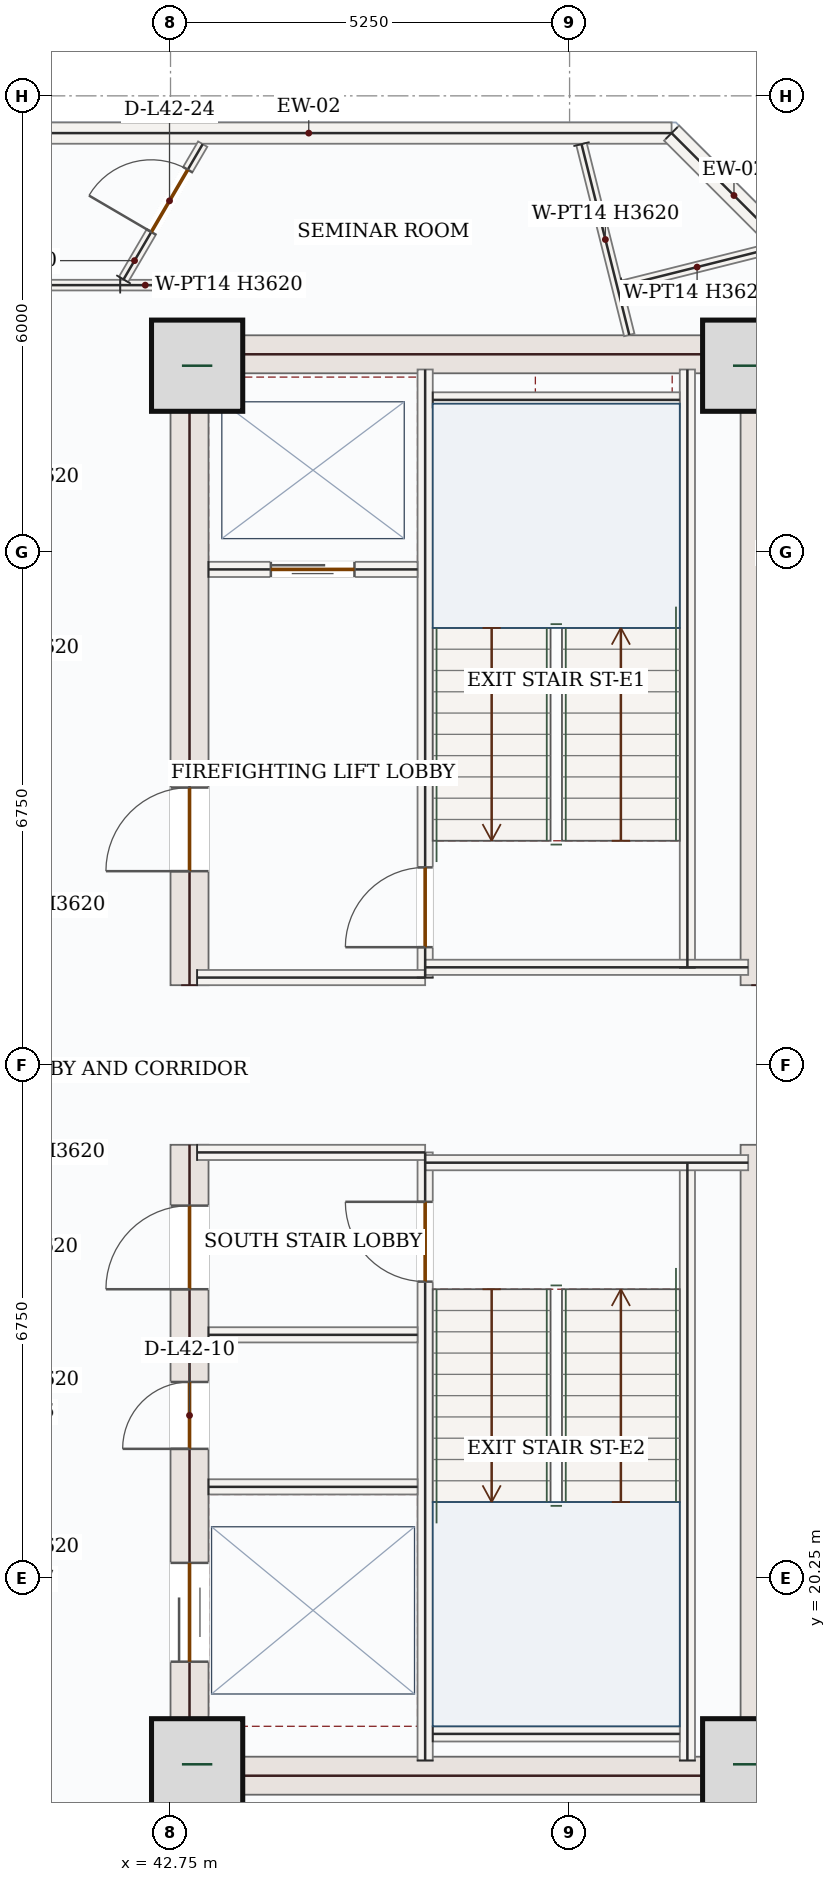
"""IFC4 building model, lengths in metres.
Left out: names, types, materials, properties, quantities, classifications, styles, units other than length and angle.
Written with IfcOpenShell. Run it as: python <this file> out.ifc"""

import sys

from ifc_helpers import new_model, si_unit, direction, frame, frame_2d, origin, origin_2d, place, context, subcontext, project, spatial, rectangle, extrude, source, transform, mapped, element, fill, save


model = new_model("IFC4")
c1 = context("Model", 3, precision=1e-05, world=origin(), true_north=direction((0.0, 1.0)))
c2 = subcontext(c1, "Body", "Model", "MODEL_VIEW")
j1 = project(units=[si_unit("LENGTHUNIT", "METRE"), si_unit("PLANEANGLEUNIT", "RADIAN")], contexts=[c1])
p1 = place(None, origin())
s1 = spatial("IfcSite", under=j1, at=p1, CompositionType="ELEMENT")
p2 = place(p1, origin())
s2 = spatial("IfcBuilding", under=s1, at=p2, CompositionType="ELEMENT")
p3 = place(p2, frame((0.0, 0.0, 182.4)))
s3 = spatial("IfcBuildingStorey", under=s2, at=p3, CompositionType="ELEMENT", Elevation=182.4)
p4 = place(p3, frame((43.0, 17.4, 0.0), z_axis=(0.0, 0.0, 1.0), x_axis=(0.0, 1.0, 0.0)))
e1 = element("IfcWall", 1, at=p4, inside=s3, PredefinedType="SHEAR", context=c2, shape_type="SweptSolid", body=[
    extrude(rectangle(XDim=8.55, YDim=0.5, at=frame_2d((4.275, 0.0))), origin(), (0.0, 0.0, 1.0), 3.62),
])
p5 = place(p4, frame((6.65, 0.0, 0.0)))
e2 = element("IfcOpeningElement", 2, at=p5, cuts=e1, PredefinedType="OPENING", context=c2, shape_type="SweptSolid", body=[
    extrude(rectangle(XDim=1.1, YDim=2.2, at=frame_2d((0.55, 1.1))), frame((0.0, 0.26, 0.0), z_axis=(0.0, -1.0, 0.0), x_axis=(1.0, 0.0, 0.0)), (0.0, 0.0, 1.0), 0.52),
])
p6 = place(p4, frame((1.75, 0.0, 0.0)))
e3 = element("IfcOpeningElement", 3, at=p6, cuts=e1, PredefinedType="OPENING", context=c2, shape_type="SweptSolid", body=[
    extrude(rectangle(XDim=1.3, YDim=2.2, at=frame_2d((0.65, 1.1))), frame((0.0, 0.26, 0.0), z_axis=(0.0, -1.0, 0.0), x_axis=(1.0, 0.0, 0.0)), (0.0, 0.0, 1.0), 0.52),
])
p7 = place(p4, frame((4.55, 0.0, 0.0)))
e4 = element("IfcOpeningElement", 4, at=p7, cuts=e1, PredefinedType="OPENING", context=c2, shape_type="SweptSolid", body=[
    extrude(rectangle(XDim=0.88, YDim=2.1, at=frame_2d((0.44, 1.05))), frame((0.0, 0.26, 0.0), z_axis=(0.0, -1.0, 0.0), x_axis=(1.0, 0.0, 0.0)), (0.0, 0.0, 1.0), 0.52),
])
p8 = place(p3, frame((43.0, 28.05, 0.0), z_axis=(0.0, 0.0, 1.0), x_axis=(0.0, 1.0, 0.0)))
e5 = element("IfcWall", 5, at=p8, inside=s3, PredefinedType="SHEAR", context=c2, shape_type="SweptSolid", body=[
    extrude(rectangle(XDim=8.55, YDim=0.5, at=frame_2d((4.275, 0.0))), origin(), (0.0, 0.0, 1.0), 3.62),
])
p9 = place(p8, frame((1.5, 0.0, 0.0)))
e6 = element("IfcOpeningElement", 6, at=p9, cuts=e5, PredefinedType="OPENING", context=c2, shape_type="SweptSolid", body=[
    extrude(rectangle(XDim=1.1, YDim=2.2, at=frame_2d((0.55, 1.1))), frame((0.0, 0.26, 0.0), z_axis=(0.0, -1.0, 0.0), x_axis=(1.0, 0.0, 0.0)), (0.0, 0.0, 1.0), 0.52),
])
m1 = source(origin(), c2, "Body", "SweptSolid", [
    extrude(rectangle(XDim=8.55, YDim=0.5, at=frame_2d((4.275, 0.0))), origin(), (0.0, 0.0, 1.0), 3.62),
])
for number, where, z_axis, x_axis in (
    (7, (50.5, 17.4, 0.0), (0.0, 0.0, 1.0), (0.0, 1.0, 0.0)),
    (8, (50.5, 28.05, 0.0), (0.0, 0.0, 1.0), (0.0, 1.0, 0.0)),
):
    element("IfcWall", number, at=place(p3, frame(where, z_axis=z_axis, x_axis=x_axis)), inside=s3, PredefinedType="SHEAR", context=c2, shape_type="MappedRepresentation", body=[
        mapped(m1, transform((0.0, 0.0, 0.0), x_axis=(1.0, 0.0, 0.0), y_axis=(0.0, 1.0, 0.0), z_axis=(0.0, 0.0, 1.0), scale=1.0)),
    ])
m2 = source(origin(), c2, "Body", "SweptSolid", [
    extrude(rectangle(XDim=7.0, YDim=0.5, at=frame_2d((3.5, 0.0))), origin(), (0.0, 0.0, 1.0), 3.62),
])
for number, where, z_axis, x_axis in (
    (9, (43.25, 17.65, 0.0), (0.0, 0.0, 1.0), (1.0, 0.0, 0.0)),
    (10, (43.25, 36.35, 0.0), (0.0, 0.0, 1.0), (1.0, 0.0, 0.0)),
):
    element("IfcWall", number, at=place(p3, frame(where, z_axis=z_axis, x_axis=x_axis)), inside=s3, PredefinedType="SHEAR", context=c2, shape_type="MappedRepresentation", body=[
        mapped(m2, transform((0.0, 0.0, 0.0), x_axis=(1.0, 0.0, 0.0), y_axis=(0.0, 1.0, 0.0), z_axis=(0.0, 0.0, 1.0), scale=1.0)),
    ])
m3 = source(origin(), c2, "Body", "SweptSolid", [
    extrude(rectangle(XDim=1.2, YDim=1.2, at=origin_2d()), origin(), (0.0, 0.0, 1.0), 3.9),
])
for number, where, z_axis, x_axis in (
    (11, (43.1, 17.8, 0.0), (0.0, 0.0, 1.0), (1.0, 0.0, 0.0)),
    (12, (50.35, 17.8, 0.0), (0.0, 0.0, 1.0), (1.0, 0.0, 0.0)),
    (13, (43.1, 36.2, 0.0), (0.0, 0.0, 1.0), (1.0, 0.0, 0.0)),
    (14, (50.35, 36.2, 0.0), (0.0, 0.0, 1.0), (1.0, 0.0, 0.0)),
):
    element("IfcColumn", number, at=place(p3, frame(where, z_axis=z_axis, x_axis=x_axis)), inside=s3, PredefinedType="COLUMN", context=c2, shape_type="MappedRepresentation", body=[
        mapped(m3, transform((0.0, 0.0, 0.0), x_axis=(1.0, 0.0, 0.0), y_axis=(0.0, 1.0, 0.0), z_axis=(0.0, 0.0, 1.0), scale=1.0)),
    ])
p10 = place(p3, frame((53.06, 18.458, 0.0), z_axis=(0.0, 0.0, 1.0), x_axis=(-0.707106781187, -0.707106781187, 0.0)))
e15 = element("IfcWall", 15, at=p10, inside=s3, PredefinedType="SOLIDWALL", context=c2, shape_type="SweptSolid", body=[
    extrude(rectangle(XDim=5.258, YDim=0.28, at=frame_2d((2.629, 0.0))), origin(), (0.0, 0.0, 1.0), 3.62),
])
p11 = place(p10, frame((1.729, 0.0, 0.85)))
e16 = element("IfcOpeningElement", 16, at=p11, cuts=e15, PredefinedType="OPENING", context=c2, shape_type="SweptSolid", body=[
    extrude(rectangle(XDim=1.8, YDim=1.75, at=frame_2d((0.9, 0.875))), frame((0.0, 0.15, 0.0), z_axis=(0.0, -1.0, 0.0), x_axis=(1.0, 0.0, 0.0)), (0.0, 0.0, 1.0), 0.3),
])
m4 = source(origin(), c2, "Body", "SweptSolid", [
    extrude(rectangle(XDim=9.547, YDim=0.28, at=frame_2d((4.773, 0.0))), origin(), (0.0, 0.0, 1.0), 3.62),
])
p12 = place(p3, frame((39.795, 39.26, 0.0), z_axis=(0.0, 0.0, 1.0), x_axis=(1.0, 0.0, 0.0)))
e17 = element("IfcWall", 17, at=p12, inside=s3, PredefinedType="SOLIDWALL", context=c2, shape_type="MappedRepresentation", body=[
    mapped(m4, transform((0.0, 0.0, 0.0), x_axis=(1.0, 0.0, 0.0), y_axis=(0.0, 1.0, 0.0), z_axis=(0.0, 0.0, 1.0), scale=1.0)),
])
m5 = source(origin(), c2, "Body", "SweptSolid", [
    extrude(rectangle(XDim=2.322, YDim=0.28, at=frame_2d((1.161, 0.0))), origin(), (0.0, 0.0, 1.0), 3.62),
])
p13 = place(p3, frame((49.342, 39.26, 0.0), z_axis=(0.0, 0.0, 1.0), x_axis=(0.707106781187, -0.707106781187, 0.0)))
e18 = element("IfcWall", 18, at=p13, inside=s3, PredefinedType="SOLIDWALL", context=c2, shape_type="MappedRepresentation", body=[
    mapped(m5, transform((0.0, 0.0, 0.0), x_axis=(1.0, 0.0, 0.0), y_axis=(0.0, 1.0, 0.0), z_axis=(0.0, 0.0, 1.0), scale=1.0)),
])
m6 = source(origin(), c2, "Body", "SweptSolid", [
    extrude(rectangle(XDim=7.87, YDim=0.2, at=frame_2d((3.935, 0.0))), origin(), (0.0, 0.0, 1.0), 3.62),
])
for number, where, z_axis, x_axis in (
    (19, (49.55, 17.85, 0.0), (0.0, 0.0, 1.0), (0.0, 1.0, 0.0)),
    (20, (49.55, 28.28, 0.0), (0.0, 0.0, 1.0), (0.0, 1.0, 0.0)),
):
    element("IfcWall", number, at=place(p3, frame(where, z_axis=z_axis, x_axis=x_axis)), inside=s3, PredefinedType="SOLIDWALL", context=c2, shape_type="MappedRepresentation", body=[
        mapped(m6, transform((0.0, 0.0, 0.0), x_axis=(1.0, 0.0, 0.0), y_axis=(0.0, 1.0, 0.0), z_axis=(0.0, 0.0, 1.0), scale=1.0)),
    ])
p14 = place(p3, frame((46.1, 17.85, 0.0), z_axis=(0.0, 0.0, 1.0), x_axis=(0.0, 1.0, 0.0)))
e21 = element("IfcWall", 21, at=p14, inside=s3, PredefinedType="SOLIDWALL", context=c2, shape_type="SweptSolid", body=[
    extrude(rectangle(XDim=8.0, YDim=0.2, at=frame_2d((4.0, 0.0))), origin(), (0.0, 0.0, 1.0), 3.62),
])
p15 = place(p14, frame((6.3, 0.0, 0.0)))
e22 = element("IfcOpeningElement", 22, at=p15, cuts=e21, PredefinedType="OPENING", context=c2, shape_type="SweptSolid", body=[
    extrude(rectangle(XDim=1.05, YDim=2.15, at=frame_2d((0.525, 1.075))), frame((0.0, 0.11, 0.0), z_axis=(0.0, -1.0, 0.0), x_axis=(1.0, 0.0, 0.0)), (0.0, 0.0, 1.0), 0.22),
])
p16 = place(p3, frame((46.1, 28.15, 0.0), z_axis=(0.0, 0.0, 1.0), x_axis=(0.0, 1.0, 0.0)))
e23 = element("IfcWall", 23, at=p16, inside=s3, PredefinedType="SOLIDWALL", context=c2, shape_type="SweptSolid", body=[
    extrude(rectangle(XDim=8.0, YDim=0.2, at=frame_2d((4.0, 0.0))), origin(), (0.0, 0.0, 1.0), 3.62),
])
p17 = place(p16, frame((0.4, 0.0, 0.0)))
e24 = element("IfcOpeningElement", 24, at=p17, cuts=e23, PredefinedType="OPENING", context=c2, shape_type="SweptSolid", body=[
    extrude(rectangle(XDim=1.05, YDim=2.15, at=frame_2d((0.525, 1.075))), frame((0.0, 0.11, 0.0), z_axis=(0.0, -1.0, 0.0), x_axis=(1.0, 0.0, 0.0)), (0.0, 0.0, 1.0), 0.22),
])
m7 = source(origin(), c2, "Body", "SweptSolid", [
    extrude(rectangle(XDim=3.0, YDim=0.2, at=frame_2d((1.5, 0.0))), origin(), (0.0, 0.0, 1.0), 3.62),
])
p18 = place(p3, frame((43.1, 25.85, 0.0), z_axis=(0.0, 0.0, 1.0), x_axis=(1.0, 0.0, 0.0)))
e25 = element("IfcWall", 25, at=p18, inside=s3, PredefinedType="SOLIDWALL", context=c2, shape_type="MappedRepresentation", body=[
    mapped(m7, transform((0.0, 0.0, 0.0), x_axis=(1.0, 0.0, 0.0), y_axis=(0.0, 1.0, 0.0), z_axis=(0.0, 0.0, 1.0), scale=1.0)),
])
m8 = source(origin(), c2, "Body", "SweptSolid", [
    extrude(rectangle(XDim=4.25, YDim=0.2, at=frame_2d((2.125, 0.0))), origin(), (0.0, 0.0, 1.0), 3.62),
])
p19 = place(p3, frame((46.1, 25.715, 0.0), z_axis=(0.0, 0.0, 1.0), x_axis=(1.0, 0.0, 0.0)))
e26 = element("IfcWall", 26, at=p19, inside=s3, PredefinedType="SOLIDWALL", context=c2, shape_type="MappedRepresentation", body=[
    mapped(m8, transform((0.0, 0.0, 0.0), x_axis=(1.0, 0.0, 0.0), y_axis=(0.0, 1.0, 0.0), z_axis=(0.0, 0.0, 1.0), scale=1.0)),
])
p20 = place(p3, frame((43.1, 28.15, 0.0), z_axis=(0.0, 0.0, 1.0), x_axis=(1.0, 0.0, 0.0)))
e27 = element("IfcWall", 27, at=p20, inside=s3, PredefinedType="SOLIDWALL", context=c2, shape_type="MappedRepresentation", body=[
    mapped(m7, transform((0.0, 0.0, 0.0), x_axis=(1.0, 0.0, 0.0), y_axis=(0.0, 1.0, 0.0), z_axis=(0.0, 0.0, 1.0), scale=1.0)),
])
p21 = place(p3, frame((46.1, 28.285, 0.0), z_axis=(0.0, 0.0, 1.0), x_axis=(1.0, 0.0, 0.0)))
e28 = element("IfcWall", 28, at=p21, inside=s3, PredefinedType="SOLIDWALL", context=c2, shape_type="MappedRepresentation", body=[
    mapped(m8, transform((0.0, 0.0, 0.0), x_axis=(1.0, 0.0, 0.0), y_axis=(0.0, 1.0, 0.0), z_axis=(0.0, 0.0, 1.0), scale=1.0)),
])
m9 = source(origin(), c2, "Body", "SweptSolid", [
    extrude(rectangle(XDim=3.25, YDim=0.2, at=frame_2d((1.625, 0.0))), origin(), (0.0, 0.0, 1.0), 3.62),
])
for number, where, z_axis, x_axis in (
    (29, (46.2, 35.75, 0.0), (0.0, 0.0, 1.0), (1.0, 0.0, 0.0)),
    (30, (46.2, 18.2, 0.0), (0.0, 0.0, 1.0), (1.0, 0.0, 0.0)),
):
    element("IfcWall", number, at=place(p3, frame(where, z_axis=z_axis, x_axis=x_axis)), inside=s3, PredefinedType="SOLIDWALL", context=c2, shape_type="MappedRepresentation", body=[
        mapped(m9, transform((0.0, 0.0, 0.0), x_axis=(1.0, 0.0, 0.0), y_axis=(0.0, 1.0, 0.0), z_axis=(0.0, 0.0, 1.0), scale=1.0)),
    ])
p22 = place(p3, frame((43.25, 33.52, 0.0), z_axis=(0.0, 0.0, 1.0), x_axis=(1.0, 0.0, 0.0)))
e31 = element("IfcWall", 31, at=p22, inside=s3, PredefinedType="SOLIDWALL", context=c2, shape_type="SweptSolid", body=[
    extrude(rectangle(XDim=2.75, YDim=0.2, at=frame_2d((1.375, 0.0))), origin(), (0.0, 0.0, 1.0), 3.62),
])
p23 = place(p22, frame((0.82, 0.0, 0.0)))
e32 = element("IfcOpeningElement", 32, at=p23, cuts=e31, PredefinedType="OPENING", context=c2, shape_type="SweptSolid", body=[
    extrude(rectangle(XDim=1.1, YDim=2.15, at=frame_2d((0.55, 1.075))), frame((0.0, 0.11, 0.0), z_axis=(0.0, -1.0, 0.0), x_axis=(1.0, 0.0, 0.0)), (0.0, 0.0, 1.0), 0.22),
])
m10 = source(origin(), c2, "Body", "SweptSolid", [
    extrude(rectangle(XDim=2.75, YDim=0.2, at=frame_2d((1.375, 0.0))), origin(), (0.0, 0.0, 1.0), 3.62),
])
for number, where, z_axis, x_axis in (
    (33, (43.25, 23.45, 0.0), (0.0, 0.0, 1.0), (1.0, 0.0, 0.0)),
    (34, (43.25, 21.45, 0.0), (0.0, 0.0, 1.0), (1.0, 0.0, 0.0)),
):
    element("IfcWall", number, at=place(p3, frame(where, z_axis=z_axis, x_axis=x_axis)), inside=s3, PredefinedType="SOLIDWALL", context=c2, shape_type="MappedRepresentation", body=[
        mapped(m10, transform((0.0, 0.0, 0.0), x_axis=(1.0, 0.0, 0.0), y_axis=(0.0, 1.0, 0.0), z_axis=(0.0, 0.0, 1.0), scale=1.0)),
    ])
m11 = source(origin(), c2, "Body", "SweptSolid", [
    extrude(rectangle(XDim=0.66, YDim=0.14, at=frame_2d((0.33, 0.0))), origin(), (0.0, 0.0, 1.0), 3.62),
])
p24 = place(p3, frame((42.748, 37.259, 0.0), z_axis=(0.0, 0.0, 1.0), x_axis=(-0.99999938363, 0.001110287991, 0.0)))
e35 = element("IfcWall", 35, at=p24, inside=s3, PredefinedType="PARTITIONING", context=c2, shape_type="MappedRepresentation", body=[
    mapped(m11, transform((0.0, 0.0, 0.0), x_axis=(1.0, 0.0, 0.0), y_axis=(0.0, 1.0, 0.0), z_axis=(0.0, 0.0, 1.0), scale=1.0)),
])
p25 = place(p3, frame((42.132, 37.335, 0.0), z_axis=(0.0, 0.0, 1.0), x_axis=(0.505011455642, 0.863112640198, 0.0)))
e36 = element("IfcWall", 36, at=p25, inside=s3, PredefinedType="PARTITIONING", context=c2, shape_type="SweptSolid", body=[
    extrude(rectangle(XDim=2.062, YDim=0.14, at=frame_2d((1.031, 0.0))), origin(), (0.0, 0.0, 1.0), 3.62),
])
p26 = place(p25, frame((0.723, 0.0, 0.0)))
e37 = element("IfcOpeningElement", 37, at=p26, cuts=e36, PredefinedType="OPENING", context=c2, shape_type="SweptSolid", body=[
    extrude(rectangle(XDim=0.95, YDim=2.15, at=frame_2d((0.475, 1.075))), frame((0.0, 0.08, 0.0), z_axis=(0.0, -1.0, 0.0), x_axis=(1.0, 0.0, 0.0)), (0.0, 0.0, 1.0), 0.16),
])
m12 = source(origin(), c2, "Body", "SweptSolid", [
    extrude(rectangle(XDim=2.588, YDim=0.14, at=frame_2d((1.294, 0.0))), origin(), (0.0, 0.0, 1.0), 3.62),
])
p27 = place(p3, frame((48.157, 39.115, 0.0), z_axis=(0.0, 0.0, 1.0), x_axis=(0.242957412811, -0.97003695577, 0.0)))
e38 = element("IfcWall", 38, at=p27, inside=s3, PredefinedType="PARTITIONING", context=c2, shape_type="MappedRepresentation", body=[
    mapped(m12, transform((0.0, 0.0, 0.0), x_axis=(1.0, 0.0, 0.0), y_axis=(0.0, 1.0, 0.0), z_axis=(0.0, 0.0, 1.0), scale=1.0)),
])
m13 = source(origin(), c2, "Body", "SweptSolid", [
    extrude(rectangle(XDim=2.014, YDim=0.14, at=frame_2d((1.007, 0.0))), origin(), (0.0, 0.0, 1.0), 3.62),
])
p28 = place(p3, frame((48.701, 37.253, 0.0), z_axis=(0.0, 0.0, 1.0), x_axis=(0.970056889313, 0.242877811867, 0.0)))
e39 = element("IfcWall", 39, at=p28, inside=s3, PredefinedType="PARTITIONING", context=c2, shape_type="MappedRepresentation", body=[
    mapped(m13, transform((0.0, 0.0, 0.0), x_axis=(1.0, 0.0, 0.0), y_axis=(0.0, 1.0, 0.0), z_axis=(0.0, 0.0, 1.0), scale=1.0)),
])
p29 = place(p3, frame((42.088, 37.26, 0.0), z_axis=(0.0, 0.0, 1.0), x_axis=(-1.0, 0.0, 0.0)))
e40 = element("IfcWall", 40, at=p29, inside=s3, PredefinedType="PARTITIONING", context=c2, shape_type="SweptSolid", body=[
    extrude(rectangle(XDim=7.806, YDim=0.14, at=frame_2d((3.903, 0.0))), origin(), (0.0, 0.0, 1.0), 3.62),
])
p30 = place(p29, frame((5.348, 0.0, 0.0)))
e41 = element("IfcOpeningElement", 41, at=p30, cuts=e40, PredefinedType="OPENING", context=c2, shape_type="SweptSolid", body=[
    extrude(rectangle(XDim=0.95, YDim=2.15, at=frame_2d((0.475, 1.075))), frame((0.0, 0.08, 0.0), z_axis=(0.0, -1.0, 0.0), x_axis=(1.0, 0.0, 0.0)), (0.0, 0.0, 1.0), 0.16),
])
m14 = source(origin(), c2, "Body", "SweptSolid", [
    extrude(rectangle(XDim=1.05, YDim=2.15, at=frame_2d((0.525, 1.075))), frame((0.0, 0.025, 0.0), z_axis=(0.0, -1.0, 0.0), x_axis=(1.0, 0.0, 0.0)), (0.0, 0.0, 1.0), 0.05),
])
p31 = place(p17, origin())
e42 = element("IfcDoor", 42, at=p31, inside=s3, OperationType="SINGLE_SWING_LEFT", PredefinedType="DOOR", context=c2, shape_type="MappedRepresentation", body=[
    mapped(m14, transform((0.0, 0.0, 0.0), x_axis=(1.0, 0.0, 0.0), y_axis=(0.0, 1.0, 0.0), z_axis=(0.0, 0.0, 1.0), scale=1.0)),
])
fill(e24, e42)
p32 = place(p15, origin())
e43 = element("IfcDoor", 43, at=p32, inside=s3, OperationType="SINGLE_SWING_RIGHT", PredefinedType="DOOR", context=c2, shape_type="MappedRepresentation", body=[
    mapped(m14, transform((0.0, 0.0, 0.0), x_axis=(1.0, 0.0, 0.0), y_axis=(0.0, 1.0, 0.0), z_axis=(0.0, 0.0, 1.0), scale=1.0)),
])
fill(e22, e43)
m15 = source(origin(), c2, "Body", "SweptSolid", [
    extrude(rectangle(XDim=1.1, YDim=2.15, at=frame_2d((0.55, 1.075))), frame((0.0, 0.025, 0.0), z_axis=(0.0, -1.0, 0.0), x_axis=(1.0, 0.0, 0.0)), (0.0, 0.0, 1.0), 0.05),
])
p33 = place(p23, origin())
e44 = element("IfcDoor", 44, at=p33, inside=s3, OperationType="DOUBLE_DOOR_SLIDING", PredefinedType="DOOR", context=c2, shape_type="MappedRepresentation", body=[
    mapped(m15, transform((0.0, 0.0, 0.0), x_axis=(1.0, 0.0, 0.0), y_axis=(0.0, 1.0, 0.0), z_axis=(0.0, 0.0, 1.0), scale=1.0)),
])
fill(e32, e44)
m16 = source(origin(), c2, "Body", "SweptSolid", [
    extrude(rectangle(XDim=1.1, YDim=2.2, at=frame_2d((0.55, 1.1))), frame((0.0, 0.025, 0.0), z_axis=(0.0, -1.0, 0.0), x_axis=(1.0, 0.0, 0.0)), (0.0, 0.0, 1.0), 0.05),
])
p34 = place(p9, origin())
e45 = element("IfcDoor", 45, at=p34, inside=s3, OperationType="SINGLE_SWING_LEFT", PredefinedType="DOOR", context=c2, shape_type="MappedRepresentation", body=[
    mapped(m16, transform((0.0, 0.0, 0.0), x_axis=(1.0, 0.0, 0.0), y_axis=(0.0, 1.0, 0.0), z_axis=(0.0, 0.0, 1.0), scale=1.0)),
])
fill(e6, e45)
p35 = place(p5, origin())
e46 = element("IfcDoor", 46, at=p35, inside=s3, OperationType="SINGLE_SWING_LEFT", PredefinedType="DOOR", context=c2, shape_type="MappedRepresentation", body=[
    mapped(m16, transform((0.0, 0.0, 0.0), x_axis=(1.0, 0.0, 0.0), y_axis=(0.0, 1.0, 0.0), z_axis=(0.0, 0.0, 1.0), scale=1.0)),
])
fill(e2, e46)
m17 = source(origin(), c2, "Body", "SweptSolid", [
    extrude(rectangle(XDim=1.3, YDim=2.2, at=frame_2d((0.65, 1.1))), frame((0.0, 0.025, 0.0), z_axis=(0.0, -1.0, 0.0), x_axis=(1.0, 0.0, 0.0)), (0.0, 0.0, 1.0), 0.05),
])
p36 = place(p6, origin())
e47 = element("IfcDoor", 47, at=p36, inside=s3, OperationType="DOUBLE_DOOR_SLIDING", PredefinedType="DOOR", context=c2, shape_type="MappedRepresentation", body=[
    mapped(m17, transform((0.0, 0.0, 0.0), x_axis=(1.0, 0.0, 0.0), y_axis=(0.0, 1.0, 0.0), z_axis=(0.0, 0.0, 1.0), scale=1.0)),
])
fill(e3, e47)
m18 = source(origin(), c2, "Body", "SweptSolid", [
    extrude(rectangle(XDim=0.88, YDim=2.1, at=frame_2d((0.44, 1.05))), frame((0.0, 0.025, 0.0), z_axis=(0.0, -1.0, 0.0), x_axis=(1.0, 0.0, 0.0)), (0.0, 0.0, 1.0), 0.05),
])
p37 = place(p7, origin())
e48 = element("IfcDoor", 48, at=p37, inside=s3, OperationType="SINGLE_SWING_LEFT", PredefinedType="DOOR", context=c2, shape_type="MappedRepresentation", body=[
    mapped(m18, transform((0.0, 0.0, 0.0), x_axis=(1.0, 0.0, 0.0), y_axis=(0.0, 1.0, 0.0), z_axis=(0.0, 0.0, 1.0), scale=1.0)),
])
fill(e4, e48)
m19 = source(origin(), c2, "Body", "SweptSolid", [
    extrude(rectangle(XDim=0.95, YDim=2.15, at=frame_2d((0.475, 1.075))), frame((0.0, 0.025, 0.0), z_axis=(0.0, -1.0, 0.0), x_axis=(1.0, 0.0, 0.0)), (0.0, 0.0, 1.0), 0.05),
])
p38 = place(p26, origin())
e49 = element("IfcDoor", 49, at=p38, inside=s3, OperationType="SINGLE_SWING_LEFT", PredefinedType="DOOR", context=c2, shape_type="MappedRepresentation", body=[
    mapped(m19, transform((0.0, 0.0, 0.0), x_axis=(1.0, 0.0, 0.0), y_axis=(0.0, 1.0, 0.0), z_axis=(0.0, 0.0, 1.0), scale=1.0)),
])
fill(e37, e49)
save(model, sys.argv[1])
